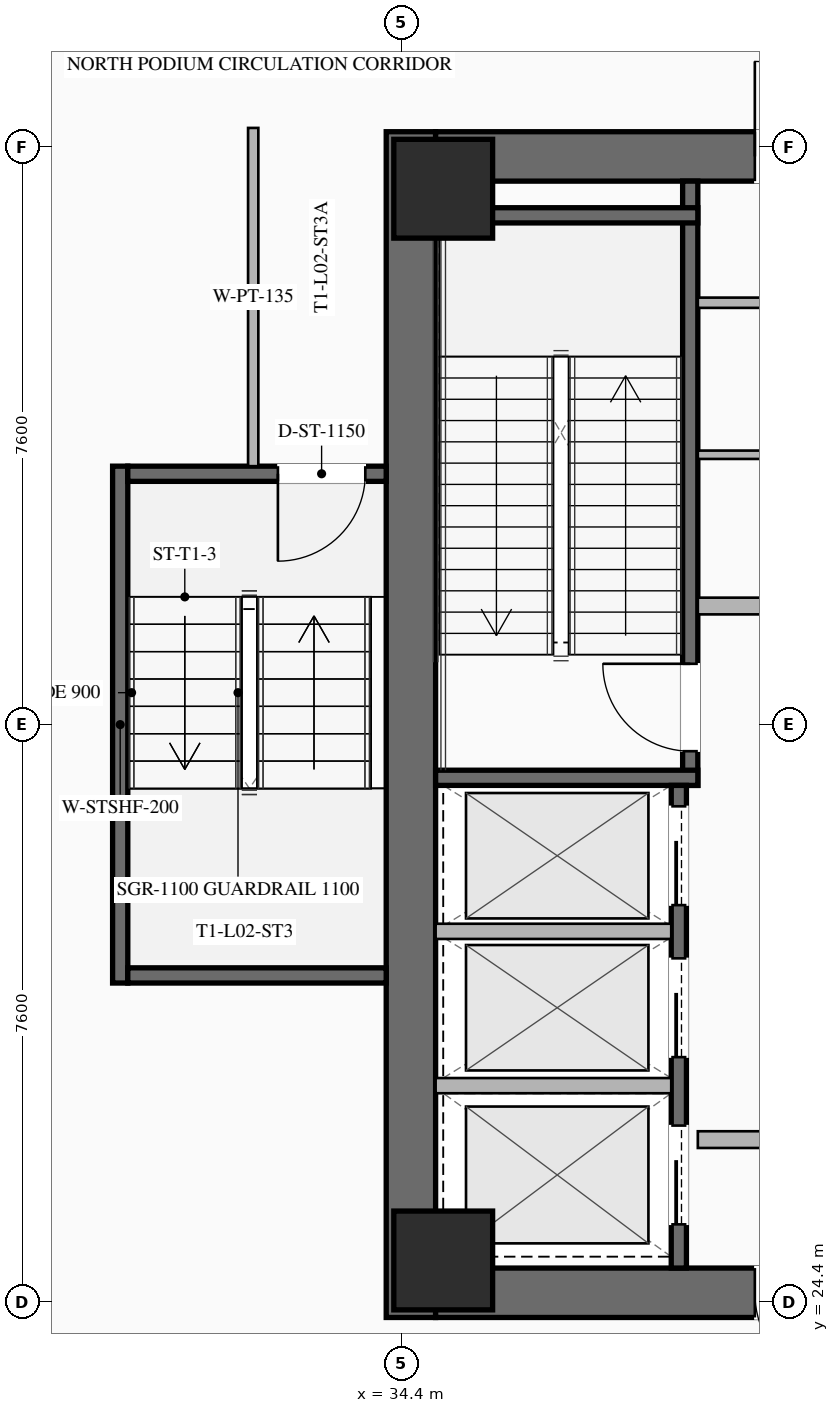
"""IFC4 building model, lengths in metres.
Left out: names, types, materials, properties, quantities, classifications, styles, units other than length and angle.
Written with IfcOpenShell. Run it as: python <this file> out.ifc"""

import sys

from ifc_helpers import new_model, si_unit, direction, frame, frame_2d, origin, origin_2d, place, context, subcontext, project, spatial, rectangle, hollow_rectangle, extrude, element, fill, save


model = new_model("IFC4")
c1 = context("Model", 3, precision=1e-05, world=origin(), true_north=direction((0.0, 1.0)))
c2 = subcontext(c1, "Body", "Model", "MODEL_VIEW")
j1 = project(units=[si_unit("LENGTHUNIT", "METRE"), si_unit("PLANEANGLEUNIT", "RADIAN")], contexts=[c1])
p1 = place(None, origin())
s1 = spatial("IfcSite", under=j1, at=p1, CompositionType="ELEMENT")
p2 = place(p1, origin())
s2 = spatial("IfcBuilding", under=s1, at=p2, CompositionType="ELEMENT")
p3 = place(p2, frame((0.0, 0.0, 10.2)))
s3 = spatial("IfcBuildingStorey", under=s2, at=p3, CompositionType="ELEMENT", Elevation=10.2)
p4 = place(p3, frame((34.525, 24.2, 0.0), z_axis=(0.0, 0.0, 1.0), x_axis=(0.0, 1.0, 0.0)))
e1 = element("IfcWall", 1, at=p4, inside=s3, PredefinedType="SHEAR", context=c2, shape_type="SweptSolid", body=[
    extrude(rectangle(XDim=15.6, YDim=0.65, at=frame_2d((7.8, 0.0))), origin(), (0.0, 0.0, 1.0), 5.4),
])
p5 = place(p3, frame((49.15, 24.525, 0.0), z_axis=(0.0, 0.0, 1.0), x_axis=(-1.0, 0.0, 0.0)))
e2 = element("IfcWall", 2, at=p5, inside=s3, PredefinedType="SHEAR", context=c2, shape_type="SweptSolid", body=[
    extrude(rectangle(XDim=14.3, YDim=0.65, at=frame_2d((7.15, 0.0))), origin(), (0.0, 0.0, 1.0), 5.4),
])
p6 = place(p5, frame((8.85, 0.0, 0.0)))
e3 = element("IfcOpeningElement", 3, at=p6, cuts=e2, PredefinedType="OPENING", context=c2, shape_type="SweptSolid", body=[
    extrude(rectangle(XDim=1.25, YDim=2.25, at=frame_2d((0.625, 1.125))), frame((0.0, 0.335, 0.0), z_axis=(0.0, -1.0, 0.0), x_axis=(1.0, 0.0, 0.0)), (0.0, 0.0, 1.0), 0.67),
])
p7 = place(p5, frame((3.8, 0.0, 0.0)))
e4 = element("IfcOpeningElement", 4, at=p7, cuts=e2, PredefinedType="OPENING", context=c2, shape_type="SweptSolid", body=[
    extrude(rectangle(XDim=1.25, YDim=2.25, at=frame_2d((0.625, 1.125))), frame((0.0, 0.335, 0.0), z_axis=(0.0, -1.0, 0.0), x_axis=(1.0, 0.0, 0.0)), (0.0, 0.0, 1.0), 0.67),
])
p8 = place(p3, frame((34.85, 39.475, 0.0), z_axis=(0.0, 0.0, 1.0), x_axis=(1.0, 0.0, 0.0)))
e5 = element("IfcWall", 5, at=p8, inside=s3, PredefinedType="SHEAR", context=c2, shape_type="SweptSolid", body=[
    extrude(rectangle(XDim=14.3, YDim=0.65, at=frame_2d((7.15, 0.0))), origin(), (0.0, 0.0, 1.0), 5.4),
])
p9 = place(p8, frame((4.2, 0.0, 0.0)))
e6 = element("IfcOpeningElement", 6, at=p9, cuts=e5, PredefinedType="OPENING", context=c2, shape_type="SweptSolid", body=[
    extrude(rectangle(XDim=1.25, YDim=2.25, at=frame_2d((0.625, 1.125))), frame((0.0, 0.335, 0.0), z_axis=(0.0, -1.0, 0.0), x_axis=(1.0, 0.0, 0.0)), (0.0, 0.0, 1.0), 0.67),
])
p10 = place(p8, frame((9.25, 0.0, 0.0)))
e7 = element("IfcOpeningElement", 7, at=p10, cuts=e5, PredefinedType="OPENING", context=c2, shape_type="SweptSolid", body=[
    extrude(rectangle(XDim=1.25, YDim=2.25, at=frame_2d((0.625, 1.125))), frame((0.0, 0.335, 0.0), z_axis=(0.0, -1.0, 0.0), x_axis=(1.0, 0.0, 0.0)), (0.0, 0.0, 1.0), 0.67),
])
for number, where, z_axis, x_axis in (
    (8, (34.95, 24.95, 0.0), (0.0, 0.0, 1.0), (1.0, 0.0, 0.0)),
    (9, (34.95, 39.05, 0.0), (0.0, 0.0, 1.0), (1.0, 0.0, 0.0)),
):
    element("IfcColumn", number, at=place(p3, frame(where, z_axis=z_axis, x_axis=x_axis)), inside=s3, PredefinedType="COLUMN", context=c2, shape_type="SweptSolid", body=[
        extrude(hollow_rectangle(XDim=1.3, YDim=1.3, WallThickness=0.05, at=origin_2d()), origin(), (0.0, 0.0, 1.0), 5.14),
    ])
p11 = place(p3, frame((38.2, 31.2, 0.0), z_axis=(0.0, 0.0, 1.0), x_axis=(0.0, 1.0, 0.0)))
e10 = element("IfcWall", 10, at=p11, inside=s3, PredefinedType="SHEAR", context=c2, shape_type="SweptSolid", body=[
    extrude(rectangle(XDim=7.95, YDim=0.2, at=frame_2d((3.975, 0.0))), origin(), (0.0, 0.0, 1.0), 5.14),
])
p12 = place(p11, frame((0.45, 0.0, 0.0)))
e11 = element("IfcOpeningElement", 11, at=p12, cuts=e10, PredefinedType="OPENING", context=c2, shape_type="SweptSolid", body=[
    extrude(rectangle(XDim=1.15, YDim=2.2, at=frame_2d((0.575, 1.1))), frame((0.0, 0.11, 0.0), z_axis=(0.0, -1.0, 0.0), x_axis=(1.0, 0.0, 0.0)), (0.0, 0.0, 1.0), 0.22),
])
for number, where, z_axis, x_axis in (
    (12, (34.85, 31.3, 0.0), (0.0, 0.0, 1.0), (1.0, 0.0, 0.0)),
    (13, (34.85, 38.7, 0.0), (0.0, 0.0, 1.0), (1.0, 0.0, 0.0)),
):
    element("IfcWall", number, at=place(p3, frame(where, z_axis=z_axis, x_axis=x_axis)), inside=s3, PredefinedType="SHEAR", context=c2, shape_type="SweptSolid", body=[
        extrude(rectangle(XDim=3.45, YDim=0.2, at=frame_2d((1.725, 0.0))), origin(), (0.0, 0.0, 1.0), 5.14),
    ])
p13 = place(p3, frame((38.3, 33.56, 0.0), z_axis=(0.0, 0.0, 1.0), x_axis=(1.0, 0.0, 0.0)))
e14 = element("IfcWall", 14, at=p13, inside=s3, PredefinedType="SOLIDWALL", context=c2, shape_type="SweptSolid", body=[
    extrude(rectangle(XDim=3.15, YDim=0.22, at=frame_2d((1.575, 0.0))), origin(), (0.0, 0.0, 1.0), 2.71),
])
p14 = place(p13, frame((1.1, 0.0, 0.0)))
e15 = element("IfcOpeningElement", 15, at=p14, cuts=e14, PredefinedType="OPENING", context=c2, shape_type="SweptSolid", body=[
    extrude(rectangle(XDim=0.95, YDim=2.05, at=frame_2d((0.475, 1.025))), frame((0.0, 0.12, 0.0), z_axis=(0.0, -1.0, 0.0), x_axis=(1.0, 0.0, 0.0)), (0.0, 0.0, 1.0), 0.24),
])
p15 = place(p3, frame((38.3, 26.54, 0.0), z_axis=(0.0, 0.0, 1.0), x_axis=(1.0, 0.0, 0.0)))
e16 = element("IfcWall", 16, at=p15, inside=s3, PredefinedType="SOLIDWALL", context=c2, shape_type="SweptSolid", body=[
    extrude(rectangle(XDim=3.15, YDim=0.22, at=frame_2d((1.575, 0.0))), origin(), (0.0, 0.0, 1.0), 2.71),
])
p16 = place(p15, frame((0.95, 0.0, 0.0)))
e17 = element("IfcOpeningElement", 17, at=p16, cuts=e16, PredefinedType="OPENING", context=c2, shape_type="SweptSolid", body=[
    extrude(rectangle(XDim=1.25, YDim=2.25, at=frame_2d((0.625, 1.125))), frame((0.0, 0.12, 0.0), z_axis=(0.0, -1.0, 0.0), x_axis=(1.0, 0.0, 0.0)), (0.0, 0.0, 1.0), 0.24),
])
p17 = place(p3, frame((38.05, 24.85, 0.0), z_axis=(0.0, 0.0, 1.0), x_axis=(0.0, 1.0, 0.0)))
e18 = element("IfcWall", 18, at=p17, inside=s3, PredefinedType="SHEAR", context=c2, shape_type="SweptSolid", body=[
    extrude(rectangle(XDim=6.35, YDim=0.2, at=frame_2d((3.175, 0.0))), origin(), (0.0, 0.0, 1.0), 5.14),
])
p18 = place(p17, frame((4.775, 0.0, 0.0)))
e19 = element("IfcOpeningElement", 19, at=p18, cuts=e18, PredefinedType="OPENING", context=c2, shape_type="SweptSolid", body=[
    extrude(rectangle(XDim=1.3, YDim=2.25, at=frame_2d((0.65, 1.125))), frame((0.0, 0.11, 0.0), z_axis=(0.0, -1.0, 0.0), x_axis=(1.0, 0.0, 0.0)), (0.0, 0.0, 1.0), 0.22),
])
p19 = place(p17, frame((2.775, 0.0, 0.0)))
e20 = element("IfcOpeningElement", 20, at=p19, cuts=e18, PredefinedType="OPENING", context=c2, shape_type="SweptSolid", body=[
    extrude(rectangle(XDim=1.3, YDim=2.25, at=frame_2d((0.65, 1.125))), frame((0.0, 0.11, 0.0), z_axis=(0.0, -1.0, 0.0), x_axis=(1.0, 0.0, 0.0)), (0.0, 0.0, 1.0), 0.22),
])
p20 = place(p17, frame((0.575, 0.0, 0.0)))
e21 = element("IfcOpeningElement", 21, at=p20, cuts=e18, PredefinedType="OPENING", context=c2, shape_type="SweptSolid", body=[
    extrude(rectangle(XDim=1.3, YDim=2.25, at=frame_2d((0.65, 1.125))), frame((0.0, 0.11, 0.0), z_axis=(0.0, -1.0, 0.0), x_axis=(1.0, 0.0, 0.0)), (0.0, 0.0, 1.0), 0.22),
])
for number, where, z_axis, x_axis in (
    (22, (34.85, 27.25, 0.0), (0.0, 0.0, 1.0), (1.0, 0.0, 0.0)),
    (23, (34.85, 29.28, 0.0), (0.0, 0.0, 1.0), (1.0, 0.0, 0.0)),
):
    element("IfcWall", number, at=place(p3, frame(where, z_axis=z_axis, x_axis=x_axis)), inside=s3, PredefinedType="SOLIDWALL", context=c2, shape_type="SweptSolid", body=[
        extrude(rectangle(XDim=3.1, YDim=0.2, at=frame_2d((1.55, 0.0))), origin(), (0.0, 0.0, 1.0), 5.14),
    ])
p21 = place(p3, frame((38.3, 37.55, 0.0), z_axis=(0.0, 0.0, 1.0), x_axis=(1.0, 0.0, 0.0)))
e24 = element("IfcWall", 24, at=p21, inside=s3, PredefinedType="PARTITIONING", context=c2, shape_type="SweptSolid", body=[
    extrude(rectangle(XDim=3.15, YDim=0.135, at=frame_2d((1.575, 0.0))), origin(), (0.0, 0.0, 1.0), 2.71),
])
p22 = place(p21, frame((1.05, 0.0, 0.0)))
e25 = element("IfcOpeningElement", 25, at=p22, cuts=e24, PredefinedType="OPENING", context=c2, shape_type="SweptSolid", body=[
    extrude(rectangle(XDim=1.05, YDim=2.2, at=frame_2d((0.525, 1.1))), frame((0.0, 0.077, 0.0), z_axis=(0.0, -1.0, 0.0), x_axis=(1.0, 0.0, 0.0)), (0.0, 0.0, 1.0), 0.155),
])
p23 = place(p3, frame((38.3, 35.55, 0.0), z_axis=(0.0, 0.0, 1.0), x_axis=(1.0, 0.0, 0.0)))
e26 = element("IfcWall", 26, at=p23, inside=s3, PredefinedType="PARTITIONING", context=c2, shape_type="SweptSolid", body=[
    extrude(rectangle(XDim=3.15, YDim=0.11, at=frame_2d((1.575, 0.0))), origin(), (0.0, 0.0, 1.0), 2.71),
])
p24 = place(p3, frame((30.7, 28.6, 0.0), z_axis=(0.0, 0.0, 1.0), x_axis=(0.0, 1.0, 0.0)))
e27 = element("IfcWall", 27, at=p24, inside=s3, PredefinedType="SHEAR", context=c2, shape_type="SweptSolid", body=[
    extrude(rectangle(XDim=6.8, YDim=0.2, at=frame_2d((3.4, 0.0))), origin(), (0.0, 0.0, 1.0), 5.14),
])
p25 = place(p3, frame((34.2, 35.3, 0.0), z_axis=(0.0, 0.0, 1.0), x_axis=(-1.0, 0.0, 0.0)))
e28 = element("IfcWall", 28, at=p25, inside=s3, PredefinedType="SHEAR", context=c2, shape_type="SweptSolid", body=[
    extrude(rectangle(XDim=3.4, YDim=0.2, at=frame_2d((1.7, 0.0))), origin(), (0.0, 0.0, 1.0), 5.14),
])
p26 = place(p25, frame((0.275, 0.0, 0.0)))
e29 = element("IfcOpeningElement", 29, at=p26, cuts=e28, PredefinedType="OPENING", context=c2, shape_type="SweptSolid", body=[
    extrude(rectangle(XDim=1.15, YDim=2.2, at=frame_2d((0.575, 1.1))), frame((0.0, 0.11, 0.0), z_axis=(0.0, -1.0, 0.0), x_axis=(1.0, 0.0, 0.0)), (0.0, 0.0, 1.0), 0.22),
])
p27 = place(p3, frame((30.8, 28.7, 0.0), z_axis=(0.0, 0.0, 1.0), x_axis=(1.0, 0.0, 0.0)))
e30 = element("IfcWall", 30, at=p27, inside=s3, PredefinedType="SHEAR", context=c2, shape_type="SweptSolid", body=[
    extrude(rectangle(XDim=3.4, YDim=0.2, at=frame_2d((1.7, 0.0))), origin(), (0.0, 0.0, 1.0), 5.14),
])
p28 = place(p3, frame((32.45, 35.4, 0.0), z_axis=(0.0, 0.0, 1.0), x_axis=(0.0, 1.0, 0.0)))
e31 = element("IfcWall", 31, at=p28, inside=s3, PredefinedType="PARTITIONING", context=c2, shape_type="SweptSolid", body=[
    extrude(rectangle(XDim=4.45, YDim=0.135, at=frame_2d((2.225, 0.0))), origin(), (0.0, 0.0, 1.0), 2.71),
])
p29 = place(p9, origin())
e32 = element("IfcDoor", 32, at=p29, inside=s3, OperationType="SINGLE_SWING_LEFT", PredefinedType="DOOR", context=c2, shape_type="SweptSolid", body=[
    extrude(rectangle(XDim=1.25, YDim=2.25, at=frame_2d((0.625, 1.125))), frame((0.0, 0.025, 0.0), z_axis=(0.0, -1.0, 0.0), x_axis=(1.0, 0.0, 0.0)), (0.0, 0.0, 1.0), 0.05),
])
fill(e6, e32)
p30 = place(p6, origin())
e33 = element("IfcDoor", 33, at=p30, inside=s3, OperationType="SINGLE_SWING_LEFT", PredefinedType="DOOR", context=c2, shape_type="SweptSolid", body=[
    extrude(rectangle(XDim=1.25, YDim=2.25, at=frame_2d((0.625, 1.125))), frame((0.0, 0.025, 0.0), z_axis=(0.0, -1.0, 0.0), x_axis=(1.0, 0.0, 0.0)), (0.0, 0.0, 1.0), 0.05),
])
fill(e3, e33)
p31 = place(p12, origin())
e34 = element("IfcDoor", 34, at=p31, inside=s3, OperationType="SINGLE_SWING_RIGHT", PredefinedType="DOOR", context=c2, shape_type="SweptSolid", body=[
    extrude(rectangle(XDim=1.15, YDim=2.2, at=frame_2d((0.575, 1.1))), frame((0.0, 0.025, 0.0), z_axis=(0.0, -1.0, 0.0), x_axis=(1.0, 0.0, 0.0)), (0.0, 0.0, 1.0), 0.05),
])
fill(e11, e34)
p32 = place(p26, origin())
e35 = element("IfcDoor", 35, at=p32, inside=s3, OperationType="SINGLE_SWING_RIGHT", PredefinedType="DOOR", context=c2, shape_type="SweptSolid", body=[
    extrude(rectangle(XDim=1.15, YDim=2.2, at=frame_2d((0.575, 1.1))), frame((0.0, 0.025, 0.0), z_axis=(0.0, -1.0, 0.0), x_axis=(1.0, 0.0, 0.0)), (0.0, 0.0, 1.0), 0.05),
])
fill(e29, e35)
p33 = place(p18, origin())
e36 = element("IfcDoor", 36, at=p33, inside=s3, OperationType="SLIDING_TO_LEFT", PredefinedType="DOOR", context=c2, shape_type="SweptSolid", body=[
    extrude(rectangle(XDim=1.3, YDim=2.25, at=frame_2d((0.65, 1.125))), frame((0.0, 0.025, 0.0), z_axis=(0.0, -1.0, 0.0), x_axis=(1.0, 0.0, 0.0)), (0.0, 0.0, 1.0), 0.05),
])
fill(e19, e36)
p34 = place(p19, origin())
e37 = element("IfcDoor", 37, at=p34, inside=s3, OperationType="SLIDING_TO_LEFT", PredefinedType="DOOR", context=c2, shape_type="SweptSolid", body=[
    extrude(rectangle(XDim=1.3, YDim=2.25, at=frame_2d((0.65, 1.125))), frame((0.0, 0.025, 0.0), z_axis=(0.0, -1.0, 0.0), x_axis=(1.0, 0.0, 0.0)), (0.0, 0.0, 1.0), 0.05),
])
fill(e20, e37)
p35 = place(p20, origin())
e38 = element("IfcDoor", 38, at=p35, inside=s3, OperationType="SLIDING_TO_LEFT", PredefinedType="DOOR", context=c2, shape_type="SweptSolid", body=[
    extrude(rectangle(XDim=1.3, YDim=2.25, at=frame_2d((0.65, 1.125))), frame((0.0, 0.025, 0.0), z_axis=(0.0, -1.0, 0.0), x_axis=(1.0, 0.0, 0.0)), (0.0, 0.0, 1.0), 0.05),
])
fill(e21, e38)
save(model, sys.argv[1])
